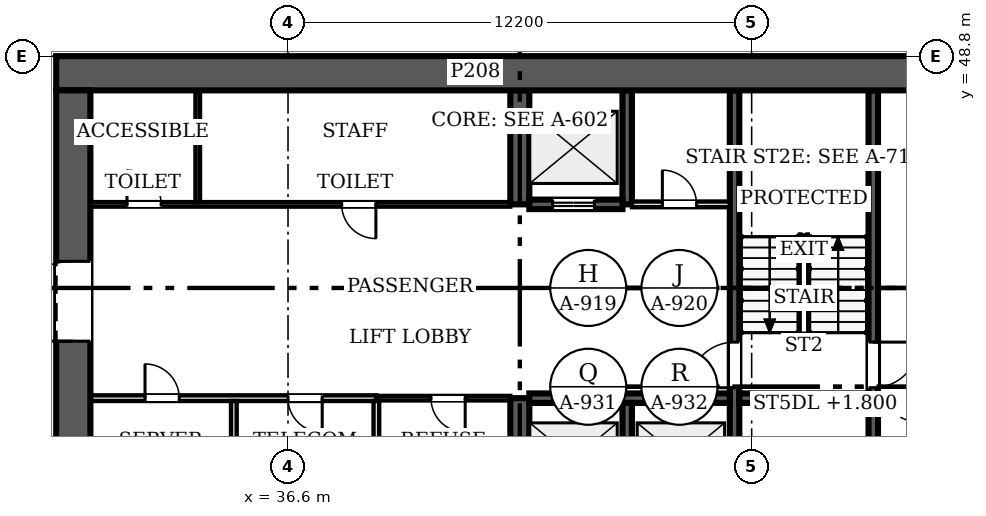
"""IFC4 building model, lengths in metres.
Left out: names, types, materials, properties, quantities, classifications, styles, units other than length and angle.
Written with IfcOpenShell. Run it as: python <this file> out.ifc"""

import sys

from ifc_helpers import new_model, si_unit, direction, frame, frame_2d, origin, place, context, subcontext, project, spatial, rectangle, extrude, source, transform, mapped, element, fill, save


model = new_model("IFC4")
c1 = context("Model", 3, precision=1e-05, world=origin(), true_north=direction((0.0, 1.0)))
c2 = subcontext(c1, "Body", "Model", "MODEL_VIEW")
j1 = project(units=[si_unit("LENGTHUNIT", "METRE"), si_unit("PLANEANGLEUNIT", "RADIAN")], contexts=[c1])
p1 = place(None, origin())
s1 = spatial("IfcSite", under=j1, at=p1, CompositionType="ELEMENT")
p2 = place(p1, origin())
s2 = spatial("IfcBuilding", under=s1, at=p2, CompositionType="ELEMENT")
p3 = place(p2, origin())
s3 = spatial("IfcBuildingStorey", under=s2, at=p3, CompositionType="ELEMENT", Elevation=0.0)
p4 = place(p3, frame((30.95, 25.3, 0.0), z_axis=(0.0, 0.0, 1.0), x_axis=(0.0, 1.0, 0.0)))
e1 = element("IfcWall", 1, at=p4, inside=s3, PredefinedType="SHEAR", context=c2, shape_type="SweptSolid", body=[
    extrude(rectangle(XDim=22.6, YDim=0.9, at=frame_2d((11.3, 0.0))), origin(), (0.0, 0.0, 1.0), 7.2),
])
m1 = source(origin(), c2, "Body", "SweptSolid", [
    extrude(rectangle(XDim=2.1, YDim=2.4, at=frame_2d((1.05, 1.2))), frame((0.0, 0.46, 0.0), z_axis=(0.0, -1.0, 0.0), x_axis=(1.0, 0.0, 0.0)), (0.0, 0.0, 1.0), 0.92),
])
p5 = place(p4, frame((4.5, 0.0, 0.0)))
e2 = element("IfcOpeningElement", 2, at=p5, cuts=e1, PredefinedType="OPENING", context=c2, shape_type="MappedRepresentation", body=[
    mapped(m1, transform((0.0, 0.0, 0.0), scale=1.0)),
])
p6 = place(p4, frame((16.0, 0.0, 0.0)))
e3 = element("IfcOpeningElement", 3, at=p6, cuts=e1, PredefinedType="OPENING", context=c2, shape_type="MappedRepresentation", body=[
    mapped(m1, transform((0.0, 0.0, 0.0), scale=1.0)),
])
p7 = place(p3, frame((30.5, 48.35, 0.0), z_axis=(0.0, 0.0, 1.0), x_axis=(1.0, 0.0, 0.0)))
e4 = element("IfcWall", 4, at=p7, inside=s3, PredefinedType="SHEAR", context=c2, shape_type="SweptSolid", body=[
    extrude(rectangle(XDim=24.4, YDim=0.9, at=frame_2d((12.2, 0.0))), origin(), (0.0, 0.0, 1.0), 7.2),
])
p8 = place(p3, frame((42.7, 36.85, 0.0), z_axis=(0.0, 0.0, 1.0), x_axis=(0.0, 1.0, 0.0)))
e5 = element("IfcWall", 5, at=p8, inside=s3, PredefinedType="SHEAR", context=c2, shape_type="SweptSolid", body=[
    extrude(rectangle(XDim=2.95, YDim=0.5, at=frame_2d((1.475, 0.0))), origin(), (0.0, 0.0, 1.0), 7.2),
])
p9 = place(p3, frame((42.7, 44.9, 0.0), z_axis=(0.0, 0.0, 1.0), x_axis=(0.0, 1.0, 0.0)))
e6 = element("IfcWall", 6, at=p9, inside=s3, PredefinedType="SHEAR", context=c2, shape_type="SweptSolid", body=[
    extrude(rectangle(XDim=3.0, YDim=0.5, at=frame_2d((1.5, 0.0))), origin(), (0.0, 0.0, 1.0), 7.2),
])
p10 = place(p3, frame((48.35, 47.9, 0.0), z_axis=(0.0, 0.0, 1.0), x_axis=(0.0, -1.0, 0.0)))
e7 = element("IfcWall", 7, at=p10, inside=s3, PredefinedType="SOLIDWALL", context=c2, shape_type="SweptSolid", body=[
    extrude(rectangle(XDim=11.05, YDim=0.25, at=frame_2d((5.525, 0.0))), origin(), (0.0, 0.0, 1.0), 7.2),
])
m2 = source(origin(), c2, "Body", "SweptSolid", [
    extrude(rectangle(XDim=1.2, YDim=2.1, at=frame_2d((0.6, 1.05))), frame((0.0, 0.135, 0.0), z_axis=(0.0, -1.0, 0.0), x_axis=(1.0, 0.0, 0.0)), (0.0, 0.0, 1.0), 0.27),
])
p11 = place(p10, frame((6.625, 0.0, 0.0)))
e8 = element("IfcOpeningElement", 8, at=p11, cuts=e7, PredefinedType="OPENING", context=c2, shape_type="MappedRepresentation", body=[
    mapped(m2, transform((0.0, 0.0, 0.0), scale=1.0)),
])
p12 = place(p3, frame((52.0, 25.3, 0.0), z_axis=(0.0, 0.0, 1.0), x_axis=(0.0, 1.0, 0.0)))
e9 = element("IfcWall", 9, at=p12, inside=s3, PredefinedType="SOLIDWALL", context=c2, shape_type="SweptSolid", body=[
    extrude(rectangle(XDim=22.6, YDim=0.25, at=frame_2d((11.3, 0.0))), origin(), (0.0, 0.0, 1.0), 7.2),
])
p13 = place(p12, frame((6.625, 0.0, 0.0)))
e10 = element("IfcOpeningElement", 10, at=p13, cuts=e9, PredefinedType="OPENING", context=c2, shape_type="MappedRepresentation", body=[
    mapped(m2, transform((0.0, 0.0, 0.0), scale=1.0)),
])
m3 = source(origin(), c2, "Body", "SweptSolid", [
    extrude(rectangle(XDim=0.9, YDim=2.1, at=frame_2d((0.45, 1.05))), frame((0.0, 0.135, 0.0), z_axis=(0.0, -1.0, 0.0), x_axis=(1.0, 0.0, 0.0)), (0.0, 0.0, 1.0), 0.27),
])
p14 = place(p12, frame((9.25, 0.0, 0.0)))
e11 = element("IfcOpeningElement", 11, at=p14, cuts=e9, PredefinedType="OPENING", context=c2, shape_type="MappedRepresentation", body=[
    mapped(m3, transform((0.0, 0.0, 0.0), scale=1.0)),
])
p15 = place(p12, frame((12.55, 0.0, 0.0)))
e12 = element("IfcOpeningElement", 12, at=p15, cuts=e9, PredefinedType="OPENING", context=c2, shape_type="MappedRepresentation", body=[
    mapped(m3, transform((0.0, 0.0, 0.0), scale=1.0)),
])
p16 = place(p12, frame((14.775, 0.0, 0.0)))
e13 = element("IfcOpeningElement", 13, at=p16, cuts=e9, PredefinedType="OPENING", context=c2, shape_type="MappedRepresentation", body=[
    mapped(m2, transform((0.0, 0.0, 0.0), scale=1.0)),
])
p17 = place(p3, frame((42.95, 39.8, 0.0), z_axis=(0.0, 0.0, 1.0), x_axis=(1.0, 0.0, 0.0)))
e14 = element("IfcWall", 14, at=p17, inside=s3, PredefinedType="SOLIDWALL", context=c2, shape_type="SweptSolid", body=[
    extrude(rectangle(XDim=5.275, YDim=0.25, at=frame_2d((2.638, 0.0))), origin(), (0.0, 0.0, 1.0), 7.2),
])
m4 = source(origin(), c2, "Body", "SweptSolid", [
    extrude(rectangle(XDim=1.1, YDim=2.1, at=frame_2d((0.55, 1.05))), frame((0.0, 0.135, 0.0), z_axis=(0.0, -1.0, 0.0), x_axis=(1.0, 0.0, 0.0)), (0.0, 0.0, 1.0), 0.27),
])
p18 = place(p17, frame((0.613, 0.0, 0.0)))
e15 = element("IfcOpeningElement", 15, at=p18, cuts=e14, PredefinedType="OPENING", context=c2, shape_type="MappedRepresentation", body=[
    mapped(m4, transform((0.0, 0.0, 0.0), scale=1.0)),
])
p19 = place(p17, frame((3.438, 0.0, 0.0)))
e16 = element("IfcOpeningElement", 16, at=p19, cuts=e14, PredefinedType="OPENING", context=c2, shape_type="MappedRepresentation", body=[
    mapped(m4, transform((0.0, 0.0, 0.0), scale=1.0)),
])
p20 = place(p3, frame((48.475, 39.8, 0.0), z_axis=(0.0, 0.0, 1.0), x_axis=(1.0, 0.0, 0.0)))
e17 = element("IfcWall", 17, at=p20, inside=s3, PredefinedType="SOLIDWALL", context=c2, shape_type="SweptSolid", body=[
    extrude(rectangle(XDim=3.4, YDim=0.25, at=frame_2d((1.7, 0.0))), origin(), (0.0, 0.0, 1.0), 7.2),
])
p21 = place(p3, frame((45.525, 36.85, 0.0), z_axis=(0.0, 0.0, 1.0), x_axis=(0.0, 1.0, 0.0)))
e18 = element("IfcWall", 18, at=p21, inside=s3, PredefinedType="SOLIDWALL", context=c2, shape_type="SweptSolid", body=[
    extrude(rectangle(XDim=2.825, YDim=0.25, at=frame_2d((1.413, 0.0))), origin(), (0.0, 0.0, 1.0), 7.2),
])
p22 = place(p3, frame((45.525, 44.9, 0.0), z_axis=(0.0, 0.0, 1.0), x_axis=(0.0, 1.0, 0.0)))
e19 = element("IfcWall", 19, at=p22, inside=s3, PredefinedType="SOLIDWALL", context=c2, shape_type="SweptSolid", body=[
    extrude(rectangle(XDim=3.0, YDim=0.25, at=frame_2d((1.5, 0.0))), origin(), (0.0, 0.0, 1.0), 7.2),
])
p23 = place(p3, frame((45.4, 44.9, 0.0), z_axis=(0.0, 0.0, 1.0), x_axis=(-1.0, 0.0, 0.0)))
e20 = element("IfcWall", 20, at=p23, inside=s3, PredefinedType="SOLIDWALL", context=c2, shape_type="SweptSolid", body=[
    extrude(rectangle(XDim=2.45, YDim=0.25, at=frame_2d((1.225, 0.0))), origin(), (0.0, 0.0, 1.0), 7.2),
])
p24 = place(p23, frame((0.738, 0.0, 0.0)))
e21 = element("IfcOpeningElement", 21, at=p24, cuts=e20, PredefinedType="OPENING", context=c2, shape_type="MappedRepresentation", body=[
    mapped(m4, transform((0.0, 0.0, 0.0), scale=1.0)),
])
p25 = place(p3, frame((31.4, 44.9, 0.0), z_axis=(0.0, 0.0, 1.0), x_axis=(1.0, 0.0, 0.0)))
e22 = element("IfcWall", 22, at=p25, inside=s3, PredefinedType="PARTITIONING", context=c2, shape_type="SweptSolid", body=[
    extrude(rectangle(XDim=11.05, YDim=0.12, at=frame_2d((5.525, 0.0))), origin(), (0.0, 0.0, 1.0), 6.95),
])
m5 = source(origin(), c2, "Body", "SweptSolid", [
    extrude(rectangle(XDim=0.9, YDim=2.1, at=frame_2d((0.45, 1.05))), frame((0.0, 0.07, 0.0), z_axis=(0.0, -1.0, 0.0), x_axis=(1.0, 0.0, 0.0)), (0.0, 0.0, 1.0), 0.14),
])
p26 = place(p25, frame((0.962, 0.0, 0.0)))
e23 = element("IfcOpeningElement", 23, at=p26, cuts=e22, PredefinedType="OPENING", context=c2, shape_type="MappedRepresentation", body=[
    mapped(m5, transform((0.0, 0.0, 0.0), scale=1.0)),
])
p27 = place(p25, frame((6.613, 0.0, 0.0)))
e24 = element("IfcOpeningElement", 24, at=p27, cuts=e22, PredefinedType="OPENING", context=c2, shape_type="MappedRepresentation", body=[
    mapped(m5, transform((0.0, 0.0, 0.0), scale=1.0)),
])
p28 = place(p3, frame((38.925, 39.8, 0.0), z_axis=(0.0, 0.0, 1.0), x_axis=(-1.0, 0.0, 0.0)))
e25 = element("IfcWall", 25, at=p28, inside=s3, PredefinedType="PARTITIONING", context=c2, shape_type="SweptSolid", body=[
    extrude(rectangle(XDim=7.525, YDim=0.15, at=frame_2d((3.763, 0.0))), origin(), (0.0, 0.0, 1.0), 6.95),
])
m6 = source(origin(), c2, "Body", "SweptSolid", [
    extrude(rectangle(XDim=0.9, YDim=2.1, at=frame_2d((0.45, 1.05))), frame((0.0, 0.085, 0.0), z_axis=(0.0, -1.0, 0.0), x_axis=(1.0, 0.0, 0.0)), (0.0, 0.0, 1.0), 0.17),
])
p29 = place(p28, frame((5.188, 0.0, 0.0)))
e26 = element("IfcOpeningElement", 26, at=p29, cuts=e25, PredefinedType="OPENING", context=c2, shape_type="MappedRepresentation", body=[
    mapped(m6, transform((0.0, 0.0, 0.0), scale=1.0)),
])
p30 = place(p28, frame((1.425, 0.0, 0.0)))
e27 = element("IfcOpeningElement", 27, at=p30, cuts=e25, PredefinedType="OPENING", context=c2, shape_type="MappedRepresentation", body=[
    mapped(m6, transform((0.0, 0.0, 0.0), scale=1.0)),
])
p31 = place(p3, frame((42.45, 39.8, 0.0), z_axis=(0.0, 0.0, 1.0), x_axis=(-1.0, 0.0, 0.0)))
e28 = element("IfcWall", 28, at=p31, inside=s3, PredefinedType="PARTITIONING", context=c2, shape_type="SweptSolid", body=[
    extrude(rectangle(XDim=3.525, YDim=0.12, at=frame_2d((1.762, 0.0))), origin(), (0.0, 0.0, 1.0), 6.95),
])
p32 = place(p31, frame((1.188, 0.0, 0.0)))
e29 = element("IfcOpeningElement", 29, at=p32, cuts=e28, PredefinedType="OPENING", context=c2, shape_type="MappedRepresentation", body=[
    mapped(m5, transform((0.0, 0.0, 0.0), scale=1.0)),
])
for number, where, z_axis, x_axis in (
    (30, (35.175, 36.85, 0.0), (0.0, 0.0, 1.0), (0.0, 1.0, 0.0)),
    (31, (38.925, 36.85, 0.0), (0.0, 0.0, 1.0), (0.0, 1.0, 0.0)),
):
    element("IfcWall", number, at=place(p3, frame(where, z_axis=z_axis, x_axis=x_axis)), inside=s3, PredefinedType="PARTITIONING", context=c2, shape_type="SweptSolid", body=[
        extrude(rectangle(XDim=2.875, YDim=0.15, at=frame_2d((1.438, 0.0))), origin(), (0.0, 0.0, 1.0), 6.95),
    ])
p33 = place(p3, frame((34.225, 44.96, 0.0), z_axis=(0.0, 0.0, 1.0), x_axis=(0.0, 1.0, 0.0)))
e32 = element("IfcWall", 32, at=p33, inside=s3, PredefinedType="PARTITIONING", context=c2, shape_type="SweptSolid", body=[
    extrude(rectangle(XDim=2.94, YDim=0.12, at=frame_2d((1.47, 0.0))), origin(), (0.0, 0.0, 1.0), 6.95),
])
p34 = place(p3, frame((45.65, 44.9, 0.0), z_axis=(0.0, 0.0, 1.0), x_axis=(1.0, 0.0, 0.0)))
e33 = element("IfcWall", 33, at=p34, inside=s3, PredefinedType="PARTITIONING", context=c2, shape_type="SweptSolid", body=[
    extrude(rectangle(XDim=2.575, YDim=0.15, at=frame_2d((1.288, 0.0))), origin(), (0.0, 0.0, 1.0), 6.95),
])
p35 = place(p34, frame((0.8, 0.0, 0.0)))
e34 = element("IfcOpeningElement", 34, at=p35, cuts=e33, PredefinedType="OPENING", context=c2, shape_type="MappedRepresentation", body=[
    mapped(m6, transform((0.0, 0.0, 0.0), scale=1.0)),
])
m7 = source(origin(), c2, "Body", "SweptSolid", [
    extrude(rectangle(XDim=2.1, YDim=2.4, at=frame_2d((1.05, 1.2))), frame((0.0, 0.025, 0.0), z_axis=(0.0, -1.0, 0.0), x_axis=(1.0, 0.0, 0.0)), (0.0, 0.0, 1.0), 0.05),
])
p36 = place(p6, origin())
e35 = element("IfcDoor", 35, at=p36, inside=s3, OperationType="DOUBLE_DOOR_SINGLE_SWING", PredefinedType="DOOR", context=c2, shape_type="MappedRepresentation", body=[
    mapped(m7, transform((0.0, 0.0, 0.0), scale=1.0)),
])
fill(e3, e35)
m8 = source(origin(), c2, "Body", "SweptSolid", [
    extrude(rectangle(XDim=1.2, YDim=2.1, at=frame_2d((0.6, 1.05))), frame((0.0, 0.025, 0.0), z_axis=(0.0, -1.0, 0.0), x_axis=(1.0, 0.0, 0.0)), (0.0, 0.0, 1.0), 0.05),
])
p37 = place(p11, origin())
e36 = element("IfcDoor", 36, at=p37, inside=s3, OperationType="SINGLE_SWING_RIGHT", PredefinedType="DOOR", context=c2, shape_type="MappedRepresentation", body=[
    mapped(m8, transform((0.0, 0.0, 0.0), scale=1.0)),
])
fill(e8, e36)
p38 = place(p16, origin())
e37 = element("IfcDoor", 37, at=p38, inside=s3, OperationType="SINGLE_SWING_RIGHT", PredefinedType="DOOR", context=c2, shape_type="MappedRepresentation", body=[
    mapped(m8, transform((0.0, 0.0, 0.0), scale=1.0)),
])
fill(e13, e37)
m9 = source(origin(), c2, "Body", "SweptSolid", [
    extrude(rectangle(XDim=1.1, YDim=2.1, at=frame_2d((0.55, 1.05))), frame((0.0, 0.025, 0.0), z_axis=(0.0, -1.0, 0.0), x_axis=(1.0, 0.0, 0.0)), (0.0, 0.0, 1.0), 0.05),
])
p39 = place(p18, origin())
e38 = element("IfcDoor", 38, at=p39, inside=s3, OperationType="DOUBLE_DOOR_SLIDING", PredefinedType="DOOR", context=c2, shape_type="MappedRepresentation", body=[
    mapped(m9, transform((0.0, 0.0, 0.0), scale=1.0)),
])
fill(e15, e38)
p40 = place(p19, origin())
e39 = element("IfcDoor", 39, at=p40, inside=s3, OperationType="DOUBLE_DOOR_SLIDING", PredefinedType="DOOR", context=c2, shape_type="MappedRepresentation", body=[
    mapped(m9, transform((0.0, 0.0, 0.0), scale=1.0)),
])
fill(e16, e39)
p41 = place(p24, origin())
e40 = element("IfcDoor", 40, at=p41, inside=s3, OperationType="DOUBLE_DOOR_SLIDING", PredefinedType="DOOR", context=c2, shape_type="MappedRepresentation", body=[
    mapped(m9, transform((0.0, 0.0, 0.0), scale=1.0)),
])
fill(e21, e40)
m10 = source(origin(), c2, "Body", "SweptSolid", [
    extrude(rectangle(XDim=0.9, YDim=2.1, at=frame_2d((0.45, 1.05))), frame((0.0, 0.025, 0.0), z_axis=(0.0, -1.0, 0.0), x_axis=(1.0, 0.0, 0.0)), (0.0, 0.0, 1.0), 0.05),
])
p42 = place(p26, origin())
e41 = element("IfcDoor", 41, at=p42, inside=s3, OperationType="SINGLE_SWING_LEFT", PredefinedType="DOOR", context=c2, shape_type="MappedRepresentation", body=[
    mapped(m10, transform((0.0, 0.0, 0.0), scale=1.0)),
])
fill(e23, e41)
p43 = place(p27, origin())
e42 = element("IfcDoor", 42, at=p43, inside=s3, OperationType="SINGLE_SWING_RIGHT", PredefinedType="DOOR", context=c2, shape_type="MappedRepresentation", body=[
    mapped(m10, transform((0.0, 0.0, 0.0), scale=1.0)),
])
fill(e24, e42)
p44 = place(p29, origin())
e43 = element("IfcDoor", 43, at=p44, inside=s3, OperationType="SINGLE_SWING_RIGHT", PredefinedType="DOOR", context=c2, shape_type="MappedRepresentation", body=[
    mapped(m10, transform((0.0, 0.0, 0.0), scale=1.0)),
])
fill(e26, e43)
p45 = place(p30, origin())
e44 = element("IfcDoor", 44, at=p45, inside=s3, OperationType="SINGLE_SWING_LEFT", PredefinedType="DOOR", context=c2, shape_type="MappedRepresentation", body=[
    mapped(m10, transform((0.0, 0.0, 0.0), scale=1.0)),
])
fill(e27, e44)
p46 = place(p32, origin())
e45 = element("IfcDoor", 45, at=p46, inside=s3, OperationType="SINGLE_SWING_LEFT", PredefinedType="DOOR", context=c2, shape_type="MappedRepresentation", body=[
    mapped(m10, transform((0.0, 0.0, 0.0), scale=1.0)),
])
fill(e29, e45)
p47 = place(p35, origin())
e46 = element("IfcDoor", 46, at=p47, inside=s3, OperationType="SINGLE_SWING_LEFT", PredefinedType="DOOR", context=c2, shape_type="MappedRepresentation", body=[
    mapped(m10, transform((0.0, 0.0, 0.0), scale=1.0)),
])
fill(e34, e46)
save(model, sys.argv[1])
